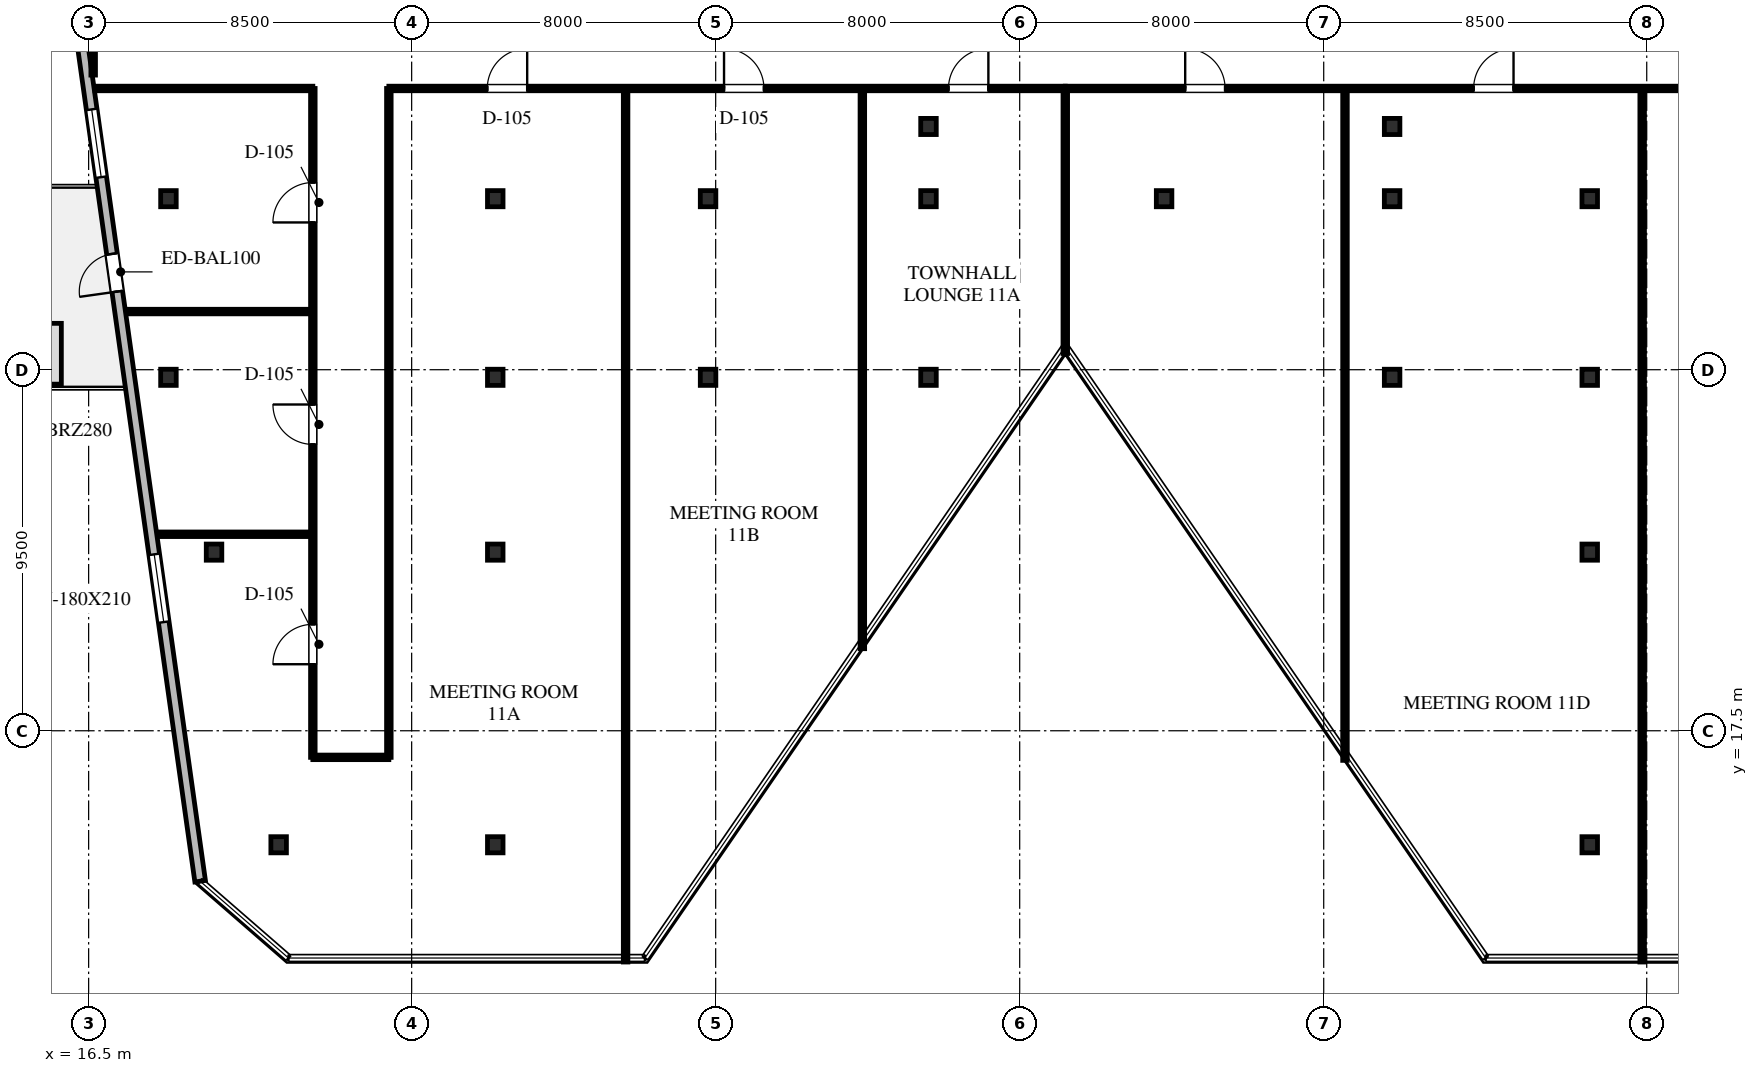
"""IFC4 building model, lengths in metres.
Left out: names, types, materials, properties, quantities, classifications, styles, units other than length and angle.
Written with IfcOpenShell. Run it as: python <this file> out.ifc"""

import sys

from ifc_helpers import new_model, si_unit, direction, frame, frame_2d, origin, origin_2d, place, context, subcontext, project, spatial, rectangle, i_section, extrude, element, fill, save


model = new_model("IFC4")
c1 = context("Model", 3, precision=1e-05, world=origin(), true_north=direction((0.0, 1.0)))
c2 = subcontext(c1, "Body", "Model", "MODEL_VIEW")
j1 = project(units=[si_unit("LENGTHUNIT", "METRE"), si_unit("PLANEANGLEUNIT", "RADIAN")], contexts=[c1])
p1 = place(None, origin())
s1 = spatial("IfcSite", under=j1, at=p1, CompositionType="ELEMENT")
p2 = place(p1, origin())
s2 = spatial("IfcBuilding", under=s1, at=p2, CompositionType="ELEMENT")
p3 = place(p2, frame((0.0, 0.0, 192.5)))
s3 = spatial("IfcBuildingStorey", under=s2, at=p3, CompositionType="ELEMENT", Elevation=192.5)
for number, where, z_axis, x_axis in (
    (1, (21.5, 14.5, 0.0), (0.0, 0.0, 1.0), (1.0, 0.0, 0.0)),
    (2, (18.6, 26.8, 0.0), (0.0, 0.0, 1.0), (1.0, 0.0, 0.0)),
    (3, (27.2, 26.8, 0.0), (0.0, 0.0, 1.0), (1.0, 0.0, 0.0)),
    (4, (32.8, 26.8, 0.0), (0.0, 0.0, 1.0), (1.0, 0.0, 0.0)),
    (5, (38.6, 26.8, 0.0), (0.0, 0.0, 1.0), (1.0, 0.0, 0.0)),
    (6, (50.8, 26.8, 0.0), (0.0, 0.0, 1.0), (1.0, 0.0, 0.0)),
    (7, (56.0, 26.8, 0.0), (0.0, 0.0, 1.0), (1.0, 0.0, 0.0)),
    (8, (18.6, 31.5, 0.0), (0.0, 0.0, 1.0), (1.0, 0.0, 0.0)),
    (9, (27.2, 31.5, 0.0), (0.0, 0.0, 1.0), (1.0, 0.0, 0.0)),
    (10, (32.8, 31.5, 0.0), (0.0, 0.0, 1.0), (1.0, 0.0, 0.0)),
    (11, (27.2, 14.5, 0.0), (0.0, 0.0, 1.0), (1.0, 0.0, 0.0)),
    (12, (38.6, 31.5, 0.0), (0.0, 0.0, 1.0), (1.0, 0.0, 0.0)),
    (13, (44.8, 31.5, 0.0), (0.0, 0.0, 1.0), (1.0, 0.0, 0.0)),
    (14, (50.8, 31.5, 0.0), (0.0, 0.0, 1.0), (1.0, 0.0, 0.0)),
    (15, (56.0, 31.5, 0.0), (0.0, 0.0, 1.0), (1.0, 0.0, 0.0)),
    (16, (56.0, 14.5, 0.0), (0.0, 0.0, 1.0), (1.0, 0.0, 0.0)),
    (17, (19.8, 22.2, 0.0), (0.0, 0.0, 1.0), (1.0, 0.0, 0.0)),
    (18, (27.2, 22.2, 0.0), (0.0, 0.0, 1.0), (1.0, 0.0, 0.0)),
    (19, (56.0, 22.2, 0.0), (0.0, 0.0, 1.0), (1.0, 0.0, 0.0)),
    (20, (38.6, 33.4, 0.0), (0.0, 0.0, 1.0), (1.0, 0.0, 0.0)),
    (21, (50.8, 33.4, 0.0), (0.0, 0.0, 1.0), (1.0, 0.0, 0.0)),
):
    element("IfcColumn", number, at=place(p3, frame(where, z_axis=z_axis, x_axis=x_axis)), inside=s3, PredefinedType="COLUMN", context=c2, shape_type="SweptSolid", body=[
        extrude(i_section(OverallWidth=0.409, OverallDepth=0.425, WebThickness=0.033, FlangeThickness=0.052, FilletRadius=0.03, at=origin_2d()), origin(), (0.0, 0.0, 1.0), 4.0),
    ])
p4 = place(p3, frame((19.434, 13.541, 0.0), z_axis=(0.0, 0.0, 1.0), x_axis=(-0.139173290738, 0.99026804207, 0.0)))
e22 = element("IfcWall", 22, at=p4, inside=s3, PredefinedType="STANDARD", context=c2, shape_type="SweptSolid", body=[
    extrude(rectangle(XDim=24.498, YDim=0.28, at=frame_2d((12.249, 0.0))), origin(), (0.0, 0.0, 1.0), 3.755),
])
p5 = place(p4, frame((15.668, 0.0, 0.0)))
e23 = element("IfcOpeningElement", 23, at=p5, cuts=e22, PredefinedType="OPENING", context=c2, shape_type="SweptSolid", body=[
    extrude(rectangle(XDim=1.0, YDim=2.15, at=frame_2d((0.5, 1.075))), frame((0.0, 0.15, 0.0), z_axis=(0.0, -1.0, 0.0), x_axis=(1.0, 0.0, 0.0)), (0.0, 0.0, 1.0), 0.3),
])
p6 = place(p4, frame((6.885, 0.0, 0.65)))
e24 = element("IfcOpeningElement", 24, at=p6, cuts=e22, PredefinedType="OPENING", context=c2, shape_type="SweptSolid", body=[
    extrude(rectangle(XDim=1.8, YDim=2.1, at=frame_2d((0.9, 1.05))), frame((0.0, 0.15, 0.0), z_axis=(0.0, -1.0, 0.0), x_axis=(1.0, 0.0, 0.0)), (0.0, 0.0, 1.0), 0.3),
])
p7 = place(p4, frame((18.708, 0.0, 0.65)))
e25 = element("IfcOpeningElement", 25, at=p7, cuts=e22, PredefinedType="OPENING", context=c2, shape_type="SweptSolid", body=[
    extrude(rectangle(XDim=1.8, YDim=2.1, at=frame_2d((0.9, 1.05))), frame((0.0, 0.15, 0.0), z_axis=(0.0, -1.0, 0.0), x_axis=(1.0, 0.0, 0.0)), (0.0, 0.0, 1.0), 0.3),
])
p8 = place(p3, frame((16.669, 34.4, 0.0), z_axis=(0.0, 0.0, 1.0), x_axis=(1.0, 0.0, 0.0)))
e26 = element("IfcWall", 26, at=p8, inside=s3, PredefinedType="PARTITIONING", context=c2, shape_type="SweptSolid", body=[
    extrude(rectangle(XDim=5.73, YDim=0.12, at=frame_2d((2.865, 0.0))), origin(), (0.0, 0.0, 1.0), 2.982),
])
p9 = place(p3, frame((24.4, 34.4, 0.0), z_axis=(0.0, 0.0, 1.0), x_axis=(1.0, 0.0, 0.0)))
e27 = element("IfcWall", 27, at=p9, inside=s3, PredefinedType="PARTITIONING", context=c2, shape_type="SweptSolid", body=[
    extrude(rectangle(XDim=17.8, YDim=0.12, at=frame_2d((8.9, 0.0))), origin(), (0.0, 0.0, 1.0), 2.982),
])
p10 = place(p9, frame((2.59, 0.0, 0.0)))
e28 = element("IfcOpeningElement", 28, at=p10, cuts=e27, PredefinedType="OPENING", context=c2, shape_type="SweptSolid", body=[
    extrude(rectangle(XDim=1.05, YDim=2.2, at=frame_2d((0.525, 1.1))), frame((0.0, 0.07, 0.0), z_axis=(0.0, -1.0, 0.0), x_axis=(1.0, 0.0, 0.0)), (0.0, 0.0, 1.0), 0.14),
])
p11 = place(p9, frame((8.82, 0.0, 0.0)))
e29 = element("IfcOpeningElement", 29, at=p11, cuts=e27, PredefinedType="OPENING", context=c2, shape_type="SweptSolid", body=[
    extrude(rectangle(XDim=1.05, YDim=2.2, at=frame_2d((0.525, 1.1))), frame((0.0, 0.07, 0.0), z_axis=(0.0, -1.0, 0.0), x_axis=(1.0, 0.0, 0.0)), (0.0, 0.0, 1.0), 0.14),
])
p12 = place(p9, frame((14.726, 0.0, 0.0)))
e30 = element("IfcOpeningElement", 30, at=p12, cuts=e27, PredefinedType="OPENING", context=c2, shape_type="SweptSolid", body=[
    extrude(rectangle(XDim=1.05, YDim=2.2, at=frame_2d((0.525, 1.1))), frame((0.0, 0.07, 0.0), z_axis=(0.0, -1.0, 0.0), x_axis=(1.0, 0.0, 0.0)), (0.0, 0.0, 1.0), 0.14),
])
p13 = place(p3, frame((42.2, 34.4, 0.0), z_axis=(0.0, 0.0, 1.0), x_axis=(1.0, 0.0, 0.0)))
e31 = element("IfcWall", 31, at=p13, inside=s3, PredefinedType="PARTITIONING", context=c2, shape_type="SweptSolid", body=[
    extrude(rectangle(XDim=23.0, YDim=0.12, at=frame_2d((11.5, 0.0))), origin(), (0.0, 0.0, 1.0), 2.982),
])
p14 = place(p13, frame((3.155, 0.0, 0.0)))
e32 = element("IfcOpeningElement", 32, at=p14, cuts=e31, PredefinedType="OPENING", context=c2, shape_type="SweptSolid", body=[
    extrude(rectangle(XDim=1.05, YDim=2.2, at=frame_2d((0.525, 1.1))), frame((0.0, 0.07, 0.0), z_axis=(0.0, -1.0, 0.0), x_axis=(1.0, 0.0, 0.0)), (0.0, 0.0, 1.0), 0.14),
])
p15 = place(p13, frame((10.745, 0.0, 0.0)))
e33 = element("IfcOpeningElement", 33, at=p15, cuts=e31, PredefinedType="OPENING", context=c2, shape_type="SweptSolid", body=[
    extrude(rectangle(XDim=1.05, YDim=2.2, at=frame_2d((0.525, 1.1))), frame((0.0, 0.07, 0.0), z_axis=(0.0, -1.0, 0.0), x_axis=(1.0, 0.0, 0.0)), (0.0, 0.0, 1.0), 0.14),
])
p16 = place(p13, frame((18.565, 0.0, 0.0)))
e34 = element("IfcOpeningElement", 34, at=p16, cuts=e31, PredefinedType="OPENING", context=c2, shape_type="SweptSolid", body=[
    extrude(rectangle(XDim=1.05, YDim=2.2, at=frame_2d((0.525, 1.1))), frame((0.0, 0.07, 0.0), z_axis=(0.0, -1.0, 0.0), x_axis=(1.0, 0.0, 0.0)), (0.0, 0.0, 1.0), 0.14),
])
p17 = place(p3, frame((16.62, 34.752, 0.0), z_axis=(0.0, 0.0, 1.0), x_axis=(0.0, 1.0, 0.0)))
e35 = element("IfcWall", 35, at=p17, inside=s3, PredefinedType="PARTITIONING", context=c2, shape_type="SweptSolid", body=[
    extrude(rectangle(XDim=3.298, YDim=0.12, at=frame_2d((1.649, 0.0))), origin(), (0.0, 0.0, 1.0), 3.755),
])
p18 = place(p3, frame((22.4, 16.8, 0.0), z_axis=(0.0, 0.0, 1.0), x_axis=(0.0, 1.0, 0.0)))
e36 = element("IfcWall", 36, at=p18, inside=s3, PredefinedType="PARTITIONING", context=c2, shape_type="SweptSolid", body=[
    extrude(rectangle(XDim=17.6, YDim=0.12, at=frame_2d((8.8, 0.0))), origin(), (0.0, 0.0, 1.0), 2.982),
])
p19 = place(p18, frame((2.45, 0.0, 0.0)))
e37 = element("IfcOpeningElement", 37, at=p19, cuts=e36, PredefinedType="OPENING", context=c2, shape_type="SweptSolid", body=[
    extrude(rectangle(XDim=1.05, YDim=2.2, at=frame_2d((0.525, 1.1))), frame((0.0, 0.07, 0.0), z_axis=(0.0, -1.0, 0.0), x_axis=(1.0, 0.0, 0.0)), (0.0, 0.0, 1.0), 0.14),
])
p20 = place(p18, frame((8.235, 0.0, 0.0)))
e38 = element("IfcOpeningElement", 38, at=p20, cuts=e36, PredefinedType="OPENING", context=c2, shape_type="SweptSolid", body=[
    extrude(rectangle(XDim=1.05, YDim=2.2, at=frame_2d((0.525, 1.1))), frame((0.0, 0.07, 0.0), z_axis=(0.0, -1.0, 0.0), x_axis=(1.0, 0.0, 0.0)), (0.0, 0.0, 1.0), 0.14),
])
p21 = place(p18, frame((14.075, 0.0, 0.0)))
e39 = element("IfcOpeningElement", 39, at=p21, cuts=e36, PredefinedType="OPENING", context=c2, shape_type="SweptSolid", body=[
    extrude(rectangle(XDim=1.05, YDim=2.2, at=frame_2d((0.525, 1.1))), frame((0.0, 0.07, 0.0), z_axis=(0.0, -1.0, 0.0), x_axis=(1.0, 0.0, 0.0)), (0.0, 0.0, 1.0), 0.14),
])
p22 = place(p3, frame((24.4, 16.8, 0.0), z_axis=(0.0, 0.0, 1.0), x_axis=(0.0, 1.0, 0.0)))
e40 = element("IfcWall", 40, at=p22, inside=s3, PredefinedType="PARTITIONING", context=c2, shape_type="SweptSolid", body=[
    extrude(rectangle(XDim=17.6, YDim=0.12, at=frame_2d((8.8, 0.0))), origin(), (0.0, 0.0, 1.0), 2.982),
])
p23 = place(p3, frame((22.4, 16.8, 0.0), z_axis=(0.0, 0.0, 1.0), x_axis=(1.0, 0.0, 0.0)))
e41 = element("IfcWall", 41, at=p23, inside=s3, PredefinedType="PARTITIONING", context=c2, shape_type="SweptSolid", body=[
    extrude(rectangle(XDim=2.0, YDim=0.12, at=frame_2d((1.0, 0.0))), origin(), (0.0, 0.0, 1.0), 3.147),
])
p24 = place(p3, frame((18.318, 22.67, 0.0), z_axis=(0.0, 0.0, 1.0), x_axis=(1.0, 0.0, 0.0)))
e42 = element("IfcWall", 42, at=p24, inside=s3, PredefinedType="PARTITIONING", context=c2, shape_type="SweptSolid", body=[
    extrude(rectangle(XDim=4.014, YDim=0.12, at=frame_2d((2.007, 0.0))), origin(), (0.0, 0.0, 1.0), 3.147),
])
p25 = place(p3, frame((17.494, 28.53, 0.0), z_axis=(0.0, 0.0, 1.0), x_axis=(1.0, 0.0, 0.0)))
e43 = element("IfcWall", 43, at=p25, inside=s3, PredefinedType="PARTITIONING", context=c2, shape_type="SweptSolid", body=[
    extrude(rectangle(XDim=4.838, YDim=0.12, at=frame_2d((2.419, 0.0))), origin(), (0.0, 0.0, 1.0), 2.982),
])
p26 = place(p3, frame((42.2, 27.427, 0.0), z_axis=(0.0, 0.0, 1.0), x_axis=(0.0, 1.0, 0.0)))
e44 = element("IfcWall", 44, at=p26, inside=s3, PredefinedType="PARTITIONING", context=c2, shape_type="SweptSolid", body=[
    extrude(rectangle(XDim=6.973, YDim=0.12, at=frame_2d((3.487, 0.0))), origin(), (0.0, 0.0, 1.0), 2.982),
])
p27 = place(p3, frame((30.63, 11.415, 0.0), z_axis=(0.0, 0.0, 1.0), x_axis=(0.0, 1.0, 0.0)))
e45 = element("IfcWall", 45, at=p27, inside=s3, PredefinedType="PARTITIONING", context=c2, shape_type="SweptSolid", body=[
    extrude(rectangle(XDim=22.917, YDim=0.12, at=frame_2d((11.458, 0.0))), origin(), (0.0, 0.0, 1.0), 2.982),
])
p28 = place(p3, frame((36.86, 19.659, 0.0), z_axis=(0.0, 0.0, 1.0), x_axis=(0.0, 1.0, 0.0)))
e46 = element("IfcWall", 46, at=p28, inside=s3, PredefinedType="PARTITIONING", context=c2, shape_type="SweptSolid", body=[
    extrude(rectangle(XDim=14.673, YDim=0.12, at=frame_2d((7.336, 0.0))), origin(), (0.0, 0.0, 1.0), 2.982),
])
p29 = place(p3, frame((49.56, 16.721, 0.0), z_axis=(0.0, 0.0, 1.0), x_axis=(0.0, 1.0, 0.0)))
e47 = element("IfcWall", 47, at=p29, inside=s3, PredefinedType="PARTITIONING", context=c2, shape_type="SweptSolid", body=[
    extrude(rectangle(XDim=17.611, YDim=0.12, at=frame_2d((8.806, 0.0))), origin(), (0.0, 0.0, 1.0), 2.982),
])
p30 = place(p3, frame((57.38, 11.415, 0.0), z_axis=(0.0, 0.0, 1.0), x_axis=(0.0, 1.0, 0.0)))
e48 = element("IfcWall", 48, at=p30, inside=s3, PredefinedType="PARTITIONING", context=c2, shape_type="SweptSolid", body=[
    extrude(rectangle(XDim=22.917, YDim=0.12, at=frame_2d((11.458, 0.0))), origin(), (0.0, 0.0, 1.0), 2.982),
])
p31 = place(p5, origin())
e49 = element("IfcDoor", 49, at=p31, inside=s3, OperationType="SINGLE_SWING_LEFT", PredefinedType="DOOR", context=c2, shape_type="SweptSolid", body=[
    extrude(rectangle(XDim=1.0, YDim=2.15, at=frame_2d((0.5, 1.075))), frame((0.0, 0.025, 0.0), z_axis=(0.0, -1.0, 0.0), x_axis=(1.0, 0.0, 0.0)), (0.0, 0.0, 1.0), 0.05),
])
fill(e23, e49)
p32 = place(p6, origin())
e50 = element("IfcWindow", 50, at=p32, inside=s3, PartitioningType="SINGLE_PANEL", PredefinedType="WINDOW", context=c2, shape_type="SweptSolid", body=[
    extrude(rectangle(XDim=1.8, YDim=2.1, at=frame_2d((0.9, 1.05))), frame((0.0, 0.03, 0.0), z_axis=(0.0, -1.0, 0.0), x_axis=(1.0, 0.0, 0.0)), (0.0, 0.0, 1.0), 0.06),
])
fill(e24, e50)
p33 = place(p7, origin())
e51 = element("IfcWindow", 51, at=p33, inside=s3, PartitioningType="SINGLE_PANEL", PredefinedType="WINDOW", context=c2, shape_type="SweptSolid", body=[
    extrude(rectangle(XDim=1.8, YDim=2.1, at=frame_2d((0.9, 1.05))), frame((0.0, 0.03, 0.0), z_axis=(0.0, -1.0, 0.0), x_axis=(1.0, 0.0, 0.0)), (0.0, 0.0, 1.0), 0.06),
])
fill(e25, e51)
p34 = place(p19, origin())
e52 = element("IfcDoor", 52, at=p34, inside=s3, OperationType="SINGLE_SWING_LEFT", PredefinedType="DOOR", context=c2, shape_type="SweptSolid", body=[
    extrude(rectangle(XDim=1.05, YDim=2.2, at=frame_2d((0.525, 1.1))), frame((0.0, 0.025, 0.0), z_axis=(0.0, -1.0, 0.0), x_axis=(1.0, 0.0, 0.0)), (0.0, 0.0, 1.0), 0.05),
])
fill(e37, e52)
p35 = place(p20, origin())
e53 = element("IfcDoor", 53, at=p35, inside=s3, OperationType="SINGLE_SWING_RIGHT", PredefinedType="DOOR", context=c2, shape_type="SweptSolid", body=[
    extrude(rectangle(XDim=1.05, YDim=2.2, at=frame_2d((0.525, 1.1))), frame((0.0, 0.025, 0.0), z_axis=(0.0, -1.0, 0.0), x_axis=(1.0, 0.0, 0.0)), (0.0, 0.0, 1.0), 0.05),
])
fill(e38, e53)
p36 = place(p21, origin())
e54 = element("IfcDoor", 54, at=p36, inside=s3, OperationType="SINGLE_SWING_LEFT", PredefinedType="DOOR", context=c2, shape_type="SweptSolid", body=[
    extrude(rectangle(XDim=1.05, YDim=2.2, at=frame_2d((0.525, 1.1))), frame((0.0, 0.025, 0.0), z_axis=(0.0, -1.0, 0.0), x_axis=(1.0, 0.0, 0.0)), (0.0, 0.0, 1.0), 0.05),
])
fill(e39, e54)
p37 = place(p10, origin())
e55 = element("IfcDoor", 55, at=p37, inside=s3, OperationType="SINGLE_SWING_RIGHT", PredefinedType="DOOR", context=c2, shape_type="SweptSolid", body=[
    extrude(rectangle(XDim=1.05, YDim=2.2, at=frame_2d((0.525, 1.1))), frame((0.0, 0.025, 0.0), z_axis=(0.0, -1.0, 0.0), x_axis=(1.0, 0.0, 0.0)), (0.0, 0.0, 1.0), 0.05),
])
fill(e28, e55)
p38 = place(p11, origin())
e56 = element("IfcDoor", 56, at=p38, inside=s3, OperationType="SINGLE_SWING_LEFT", PredefinedType="DOOR", context=c2, shape_type="SweptSolid", body=[
    extrude(rectangle(XDim=1.05, YDim=2.2, at=frame_2d((0.525, 1.1))), frame((0.0, 0.025, 0.0), z_axis=(0.0, -1.0, 0.0), x_axis=(1.0, 0.0, 0.0)), (0.0, 0.0, 1.0), 0.05),
])
fill(e29, e56)
p39 = place(p12, origin())
e57 = element("IfcDoor", 57, at=p39, inside=s3, OperationType="SINGLE_SWING_RIGHT", PredefinedType="DOOR", context=c2, shape_type="SweptSolid", body=[
    extrude(rectangle(XDim=1.05, YDim=2.2, at=frame_2d((0.525, 1.1))), frame((0.0, 0.025, 0.0), z_axis=(0.0, -1.0, 0.0), x_axis=(1.0, 0.0, 0.0)), (0.0, 0.0, 1.0), 0.05),
])
fill(e30, e57)
p40 = place(p14, origin())
e58 = element("IfcDoor", 58, at=p40, inside=s3, OperationType="SINGLE_SWING_LEFT", PredefinedType="DOOR", context=c2, shape_type="SweptSolid", body=[
    extrude(rectangle(XDim=1.05, YDim=2.2, at=frame_2d((0.525, 1.1))), frame((0.0, 0.025, 0.0), z_axis=(0.0, -1.0, 0.0), x_axis=(1.0, 0.0, 0.0)), (0.0, 0.0, 1.0), 0.05),
])
fill(e32, e58)
p41 = place(p15, origin())
e59 = element("IfcDoor", 59, at=p41, inside=s3, OperationType="SINGLE_SWING_RIGHT", PredefinedType="DOOR", context=c2, shape_type="SweptSolid", body=[
    extrude(rectangle(XDim=1.05, YDim=2.2, at=frame_2d((0.525, 1.1))), frame((0.0, 0.025, 0.0), z_axis=(0.0, -1.0, 0.0), x_axis=(1.0, 0.0, 0.0)), (0.0, 0.0, 1.0), 0.05),
])
fill(e33, e59)
save(model, sys.argv[1])
